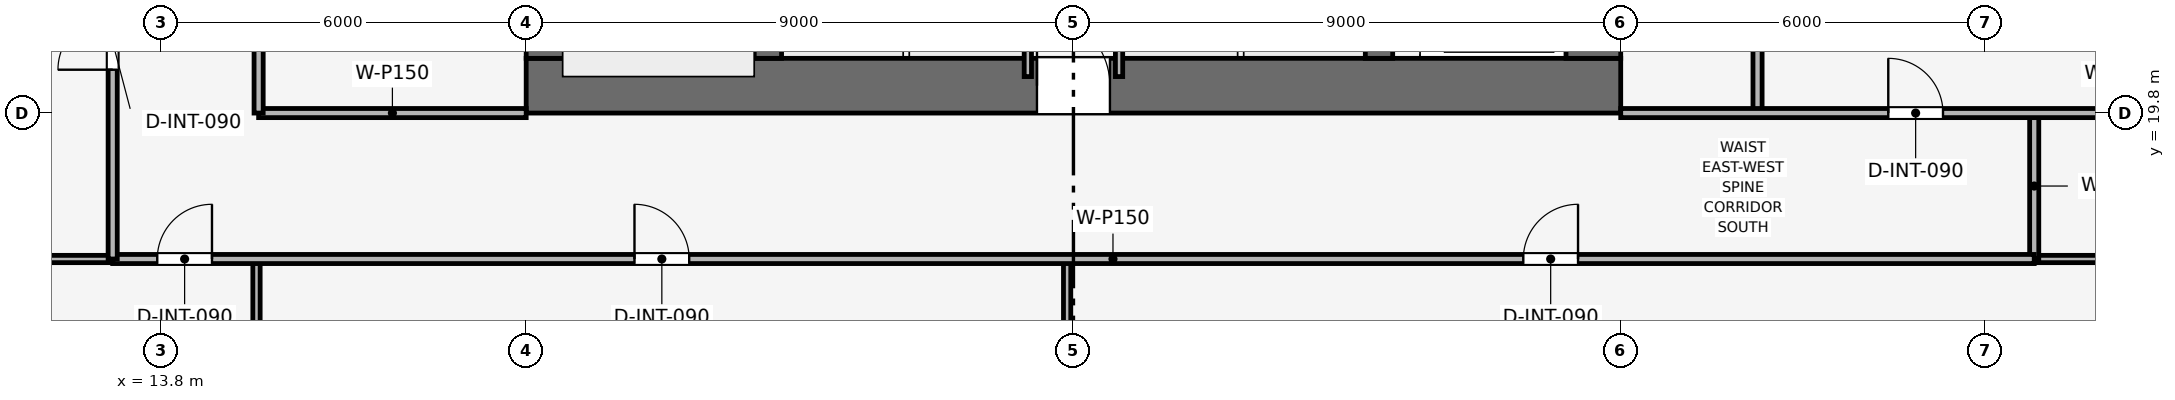
"""IFC4 building model, lengths in metres.
Left out: names, types, materials, properties, quantities, classifications, styles, units other than length and angle.
Written with IfcOpenShell. Run it as: python <this file> out.ifc"""

import sys

from ifc_helpers import new_model, si_unit, direction, frame, frame_2d, origin, place, context, subcontext, project, spatial, rectangle, extrude, element, fill, save


model = new_model("IFC4")
c1 = context("Model", 3, precision=1e-05, world=origin(), true_north=direction((0.0, 1.0)))
c2 = subcontext(c1, "Body", "Model", "MODEL_VIEW")
j1 = project(units=[si_unit("LENGTHUNIT", "METRE"), si_unit("PLANEANGLEUNIT", "RADIAN")], contexts=[c1])
p1 = place(None, origin())
s1 = spatial("IfcSite", under=j1, at=p1, CompositionType="ELEMENT")
p2 = place(p1, origin())
s2 = spatial("IfcBuilding", under=s1, at=p2, CompositionType="ELEMENT")
p3 = place(p2, frame((0.0, 0.0, 142.05)))
s3 = spatial("IfcBuildingStorey", under=s2, at=p3, CompositionType="ELEMENT", Elevation=142.05)
p4 = place(p3, frame((19.8, 20.25, 0.0), z_axis=(0.0, 0.0, 1.0), x_axis=(1.0, 0.0, 0.0)))
e1 = element("IfcWall", 1, at=p4, inside=s3, PredefinedType="SHEAR", context=c2, shape_type="SweptSolid", body=[
    extrude(rectangle(XDim=18.0, YDim=0.9, at=frame_2d((9.0, 0.0))), origin(), (0.0, 0.0, 1.0), 3.75),
])
p5 = place(p4, frame((8.4, 0.0, 0.0)))
e2 = element("IfcOpeningElement", 2, at=p5, cuts=e1, PredefinedType="OPENING", context=c2, shape_type="SweptSolid", body=[
    extrude(rectangle(XDim=1.2, YDim=2.2, at=frame_2d((0.6, 1.1))), frame((0.0, 0.46, 0.0), z_axis=(0.0, -1.0, 0.0), x_axis=(1.0, 0.0, 0.0)), (0.0, 0.0, 1.0), 0.92),
])
p6 = place(p3, frame((20.25, 20.7, 0.0), z_axis=(0.0, 0.0, 1.0), x_axis=(0.0, 1.0, 0.0)))
e3 = element("IfcWall", 3, at=p6, inside=s3, PredefinedType="SHEAR", context=c2, shape_type="SweptSolid", body=[
    extrude(rectangle(XDim=16.2, YDim=0.9, at=frame_2d((8.1, 0.0))), origin(), (0.0, 0.0, 1.0), 3.75),
])
p7 = place(p6, frame((10.1, 0.0, 0.0)))
e4 = element("IfcOpeningElement", 4, at=p7, cuts=e3, PredefinedType="OPENING", context=c2, shape_type="SweptSolid", body=[
    extrude(rectangle(XDim=1.1, YDim=2.15, at=frame_2d((0.55, 1.075))), frame((0.0, 0.46, 0.0), z_axis=(0.0, -1.0, 0.0), x_axis=(1.0, 0.0, 0.0)), (0.0, 0.0, 1.0), 0.92),
])
p8 = place(p3, frame((37.35, 20.7, 0.0), z_axis=(0.0, 0.0, 1.0), x_axis=(0.0, 1.0, 0.0)))
e5 = element("IfcWall", 5, at=p8, inside=s3, PredefinedType="SHEAR", context=c2, shape_type="SweptSolid", body=[
    extrude(rectangle(XDim=16.2, YDim=0.9, at=frame_2d((8.1, 0.0))), origin(), (0.0, 0.0, 1.0), 3.75),
])
p9 = place(p8, frame((4.6, 0.0, 0.0)))
e6 = element("IfcOpeningElement", 6, at=p9, cuts=e5, PredefinedType="OPENING", context=c2, shape_type="SweptSolid", body=[
    extrude(rectangle(XDim=1.1, YDim=2.15, at=frame_2d((0.55, 1.075))), frame((0.0, 0.46, 0.0), z_axis=(0.0, -1.0, 0.0), x_axis=(1.0, 0.0, 0.0)), (0.0, 0.0, 1.0), 0.92),
])
for number, where, z_axis, x_axis in (
    (7, (23.775, 20.7, 0.0), (0.0, 0.0, 1.0), (0.0, 1.0, 0.0)),
    (8, (33.825, 20.7, 0.0), (0.0, 0.0, 1.0), (0.0, 1.0, 0.0)),
):
    element("IfcWall", number, at=place(p3, frame(where, z_axis=z_axis, x_axis=x_axis)), inside=s3, PredefinedType="SHEAR", context=c2, shape_type="SweptSolid", body=[
        extrude(rectangle(XDim=16.2, YDim=0.45, at=frame_2d((8.1, 0.0))), origin(), (0.0, 0.0, 1.0), 3.75),
    ])
for number, where, z_axis, x_axis in (
    (9, (28.05, 20.4, 0.0), (0.0, 0.0, 1.0), (0.0, 1.0, 0.0)),
    (10, (29.55, 20.4, 0.0), (0.0, 0.0, 1.0), (0.0, 1.0, 0.0)),
):
    element("IfcWall", number, at=place(p3, frame(where, z_axis=z_axis, x_axis=x_axis)), inside=s3, PredefinedType="PARTITIONING", context=c2, shape_type="SweptSolid", body=[
        extrude(rectangle(XDim=2.75, YDim=0.12, at=frame_2d((1.375, 0.0))), origin(), (0.0, 0.0, 1.0), 3.495),
    ])
p10 = place(p3, frame((15.4, 19.8, 0.0), z_axis=(0.0, 0.0, 1.0), x_axis=(1.0, 0.0, 0.0)))
e11 = element("IfcWall", 11, at=p10, inside=s3, PredefinedType="PARTITIONING", context=c2, shape_type="SweptSolid", body=[
    extrude(rectangle(XDim=4.4, YDim=0.15, at=frame_2d((2.2, 0.0))), origin(), (0.0, 0.0, 1.0), 3.03),
])
p11 = place(p3, frame((15.4, 19.8, 0.0), z_axis=(0.0, 0.0, 1.0), x_axis=(0.0, 1.0, 0.0)))
e12 = element("IfcWall", 12, at=p11, inside=s3, PredefinedType="PARTITIONING", context=c2, shape_type="SweptSolid", body=[
    extrude(rectangle(XDim=10.35, YDim=0.15, at=frame_2d((5.175, 0.0))), origin(), (0.0, 0.0, 1.0), 3.03),
])
p12 = place(p11, frame((1.2, 0.0, 0.0)))
e13 = element("IfcOpeningElement", 13, at=p12, cuts=e12, PredefinedType="OPENING", context=c2, shape_type="SweptSolid", body=[
    extrude(rectangle(XDim=0.9, YDim=2.1, at=frame_2d((0.45, 1.05))), frame((0.0, 0.085, 0.0), z_axis=(0.0, -1.0, 0.0), x_axis=(1.0, 0.0, 0.0)), (0.0, 0.0, 1.0), 0.17),
])
p13 = place(p11, frame((4.7, 0.0, 0.0)))
e14 = element("IfcOpeningElement", 14, at=p13, cuts=e12, PredefinedType="OPENING", context=c2, shape_type="SweptSolid", body=[
    extrude(rectangle(XDim=0.9, YDim=2.1, at=frame_2d((0.45, 1.05))), frame((0.0, 0.085, 0.0), z_axis=(0.0, -1.0, 0.0), x_axis=(1.0, 0.0, 0.0)), (0.0, 0.0, 1.0), 0.17),
])
p14 = place(p11, frame((8.1, 0.0, 0.0)))
e15 = element("IfcOpeningElement", 15, at=p14, cuts=e12, PredefinedType="OPENING", context=c2, shape_type="SweptSolid", body=[
    extrude(rectangle(XDim=0.95, YDim=2.1, at=frame_2d((0.475, 1.05))), frame((0.0, 0.085, 0.0), z_axis=(0.0, -1.0, 0.0), x_axis=(1.0, 0.0, 0.0)), (0.0, 0.0, 1.0), 0.17),
])
p15 = place(p3, frame((40.05, 19.8, 0.0), z_axis=(0.0, 0.0, 1.0), x_axis=(0.0, 1.0, 0.0)))
e16 = element("IfcWall", 16, at=p15, inside=s3, PredefinedType="PARTITIONING", context=c2, shape_type="SweptSolid", body=[
    extrude(rectangle(XDim=7.05, YDim=0.15, at=frame_2d((3.525, 0.0))), origin(), (0.0, 0.0, 1.0), 3.03),
])
for number, where, z_axis, x_axis in (
    (17, (15.365, 4.63, 0.0), (0.0, 0.0, 1.0), (0.0, 1.0, 0.0)),
    (18, (28.696, 4.63, 0.0), (0.0, 0.0, 1.0), (0.0, 1.0, 0.0)),
):
    element("IfcWall", number, at=place(p3, frame(where, z_axis=z_axis, x_axis=x_axis)), inside=s3, PredefinedType="PARTITIONING", context=c2, shape_type="SweptSolid", body=[
        extrude(rectangle(XDim=12.77, YDim=0.12, at=frame_2d((6.385, 0.0))), origin(), (0.0, 0.0, 1.0), 2.98),
    ])
p16 = place(p3, frame((4.63, 17.4, 0.0), z_axis=(0.0, 0.0, 1.0), x_axis=(1.0, 0.0, 0.0)))
e19 = element("IfcWall", 19, at=p16, inside=s3, PredefinedType="PARTITIONING", context=c2, shape_type="SweptSolid", body=[
    extrude(rectangle(XDim=8.37, YDim=0.12, at=frame_2d((4.185, 0.0))), origin(), (0.0, 0.0, 1.0), 2.98),
])
p17 = place(p3, frame((44.6, 17.4, 0.0), z_axis=(0.0, 0.0, 1.0), x_axis=(1.0, 0.0, 0.0)))
e20 = element("IfcWall", 20, at=p17, inside=s3, PredefinedType="PARTITIONING", context=c2, shape_type="SweptSolid", body=[
    extrude(rectangle(XDim=8.37, YDim=0.12, at=frame_2d((4.185, 0.0))), origin(), (0.0, 0.0, 1.0), 2.98),
])
p18 = place(p3, frame((44.6, 17.4, 0.0), z_axis=(0.0, 0.0, 1.0), x_axis=(0.0, 1.0, 0.0)))
e21 = element("IfcWall", 21, at=p18, inside=s3, PredefinedType="PARTITIONING", context=c2, shape_type="SweptSolid", body=[
    extrude(rectangle(XDim=2.4, YDim=0.15, at=frame_2d((1.2, 0.0))), origin(), (0.0, 0.0, 1.0), 3.495),
])
p19 = place(p3, frame((37.8, 19.8, 0.0), z_axis=(0.0, 0.0, 1.0), x_axis=(1.0, 0.0, 0.0)))
e22 = element("IfcWall", 22, at=p19, inside=s3, PredefinedType="PARTITIONING", context=c2, shape_type="SweptSolid", body=[
    extrude(rectangle(XDim=15.17, YDim=0.15, at=frame_2d((7.585, 0.0))), origin(), (0.0, 0.0, 1.0), 2.98),
])
p20 = place(p19, frame((4.4, 0.0, 0.0)))
e23 = element("IfcOpeningElement", 23, at=p20, cuts=e22, PredefinedType="OPENING", context=c2, shape_type="SweptSolid", body=[
    extrude(rectangle(XDim=0.9, YDim=2.1, at=frame_2d((0.45, 1.05))), frame((0.0, 0.085, 0.0), z_axis=(0.0, -1.0, 0.0), x_axis=(1.0, 0.0, 0.0)), (0.0, 0.0, 1.0), 0.17),
])
p21 = place(p3, frame((13.0, 17.4, 0.0), z_axis=(0.0, 0.0, 1.0), x_axis=(1.0, 0.0, 0.0)))
e24 = element("IfcWall", 24, at=p21, inside=s3, PredefinedType="PARTITIONING", context=c2, shape_type="SweptSolid", body=[
    extrude(rectangle(XDim=31.6, YDim=0.15, at=frame_2d((15.8, 0.0))), origin(), (0.0, 0.0, 1.0), 3.03),
])
p22 = place(p21, frame((0.733, 0.0, 0.0)))
e25 = element("IfcOpeningElement", 25, at=p22, cuts=e24, PredefinedType="OPENING", context=c2, shape_type="SweptSolid", body=[
    extrude(rectangle(XDim=0.9, YDim=2.1, at=frame_2d((0.45, 1.05))), frame((0.0, 0.085, 0.0), z_axis=(0.0, -1.0, 0.0), x_axis=(1.0, 0.0, 0.0)), (0.0, 0.0, 1.0), 0.17),
])
p23 = place(p21, frame((8.581, 0.0, 0.0)))
e26 = element("IfcOpeningElement", 26, at=p23, cuts=e24, PredefinedType="OPENING", context=c2, shape_type="SweptSolid", body=[
    extrude(rectangle(XDim=0.9, YDim=2.1, at=frame_2d((0.45, 1.05))), frame((0.0, 0.085, 0.0), z_axis=(0.0, -1.0, 0.0), x_axis=(1.0, 0.0, 0.0)), (0.0, 0.0, 1.0), 0.17),
])
p24 = place(p21, frame((23.198, 0.0, 0.0)))
e27 = element("IfcOpeningElement", 27, at=p24, cuts=e24, PredefinedType="OPENING", context=c2, shape_type="SweptSolid", body=[
    extrude(rectangle(XDim=0.9, YDim=2.1, at=frame_2d((0.45, 1.05))), frame((0.0, 0.085, 0.0), z_axis=(0.0, -1.0, 0.0), x_axis=(1.0, 0.0, 0.0)), (0.0, 0.0, 1.0), 0.17),
])
p25 = place(p3, frame((13.0, 17.4, 0.0), z_axis=(0.0, 0.0, 1.0), x_axis=(0.0, 1.0, 0.0)))
e28 = element("IfcWall", 28, at=p25, inside=s3, PredefinedType="PARTITIONING", context=c2, shape_type="SweptSolid", body=[
    extrude(rectangle(XDim=22.8, YDim=0.15, at=frame_2d((11.4, 0.0))), origin(), (0.0, 0.0, 1.0), 3.03),
])
p26 = place(p25, frame((3.113, 0.0, 0.0)))
e29 = element("IfcOpeningElement", 29, at=p26, cuts=e28, PredefinedType="OPENING", context=c2, shape_type="SweptSolid", body=[
    extrude(rectangle(XDim=0.9, YDim=2.1, at=frame_2d((0.45, 1.05))), frame((0.0, 0.085, 0.0), z_axis=(0.0, -1.0, 0.0), x_axis=(1.0, 0.0, 0.0)), (0.0, 0.0, 1.0), 0.17),
])
p27 = place(p25, frame((7.542, 0.0, 0.0)))
e30 = element("IfcOpeningElement", 30, at=p27, cuts=e28, PredefinedType="OPENING", context=c2, shape_type="SweptSolid", body=[
    extrude(rectangle(XDim=0.9, YDim=2.1, at=frame_2d((0.45, 1.05))), frame((0.0, 0.085, 0.0), z_axis=(0.0, -1.0, 0.0), x_axis=(1.0, 0.0, 0.0)), (0.0, 0.0, 1.0), 0.17),
])
p28 = place(p25, frame((15.378, 0.0, 0.0)))
e31 = element("IfcOpeningElement", 31, at=p28, cuts=e28, PredefinedType="OPENING", context=c2, shape_type="SweptSolid", body=[
    extrude(rectangle(XDim=0.9, YDim=2.1, at=frame_2d((0.45, 1.05))), frame((0.0, 0.085, 0.0), z_axis=(0.0, -1.0, 0.0), x_axis=(1.0, 0.0, 0.0)), (0.0, 0.0, 1.0), 0.17),
])
p29 = place(p20, origin())
e32 = element("IfcDoor", 32, at=p29, inside=s3, OperationType="SINGLE_SWING_LEFT", PredefinedType="DOOR", context=c2, shape_type="SweptSolid", body=[
    extrude(rectangle(XDim=0.9, YDim=2.1, at=frame_2d((0.45, 1.05))), frame((0.0, 0.025, 0.0), z_axis=(0.0, -1.0, 0.0), x_axis=(1.0, 0.0, 0.0)), (0.0, 0.0, 1.0), 0.05),
])
fill(e23, e32)
p30 = place(p22, origin())
e33 = element("IfcDoor", 33, at=p30, inside=s3, OperationType="SINGLE_SWING_RIGHT", PredefinedType="DOOR", context=c2, shape_type="SweptSolid", body=[
    extrude(rectangle(XDim=0.9, YDim=2.1, at=frame_2d((0.45, 1.05))), frame((0.0, 0.025, 0.0), z_axis=(0.0, -1.0, 0.0), x_axis=(1.0, 0.0, 0.0)), (0.0, 0.0, 1.0), 0.05),
])
fill(e25, e33)
p31 = place(p23, origin())
e34 = element("IfcDoor", 34, at=p31, inside=s3, OperationType="SINGLE_SWING_LEFT", PredefinedType="DOOR", context=c2, shape_type="SweptSolid", body=[
    extrude(rectangle(XDim=0.9, YDim=2.1, at=frame_2d((0.45, 1.05))), frame((0.0, 0.025, 0.0), z_axis=(0.0, -1.0, 0.0), x_axis=(1.0, 0.0, 0.0)), (0.0, 0.0, 1.0), 0.05),
])
fill(e26, e34)
p32 = place(p24, origin())
e35 = element("IfcDoor", 35, at=p32, inside=s3, OperationType="SINGLE_SWING_RIGHT", PredefinedType="DOOR", context=c2, shape_type="SweptSolid", body=[
    extrude(rectangle(XDim=0.9, YDim=2.1, at=frame_2d((0.45, 1.05))), frame((0.0, 0.025, 0.0), z_axis=(0.0, -1.0, 0.0), x_axis=(1.0, 0.0, 0.0)), (0.0, 0.0, 1.0), 0.05),
])
fill(e27, e35)
p33 = place(p26, origin())
e36 = element("IfcDoor", 36, at=p33, inside=s3, OperationType="SINGLE_SWING_LEFT", PredefinedType="DOOR", context=c2, shape_type="SweptSolid", body=[
    extrude(rectangle(XDim=0.9, YDim=2.1, at=frame_2d((0.45, 1.05))), frame((0.0, 0.025, 0.0), z_axis=(0.0, -1.0, 0.0), x_axis=(1.0, 0.0, 0.0)), (0.0, 0.0, 1.0), 0.05),
])
fill(e29, e36)
p34 = place(p5, origin())
e37 = element("IfcDoor", 37, at=p34, inside=s3, OperationType="SINGLE_SWING_LEFT", PredefinedType="DOOR", context=c2, shape_type="SweptSolid", body=[
    extrude(rectangle(XDim=1.2, YDim=2.2, at=frame_2d((0.6, 1.1))), frame((0.0, 0.025, 0.0), z_axis=(0.0, -1.0, 0.0), x_axis=(1.0, 0.0, 0.0)), (0.0, 0.0, 1.0), 0.05),
])
fill(e2, e37)
save(model, sys.argv[1])
